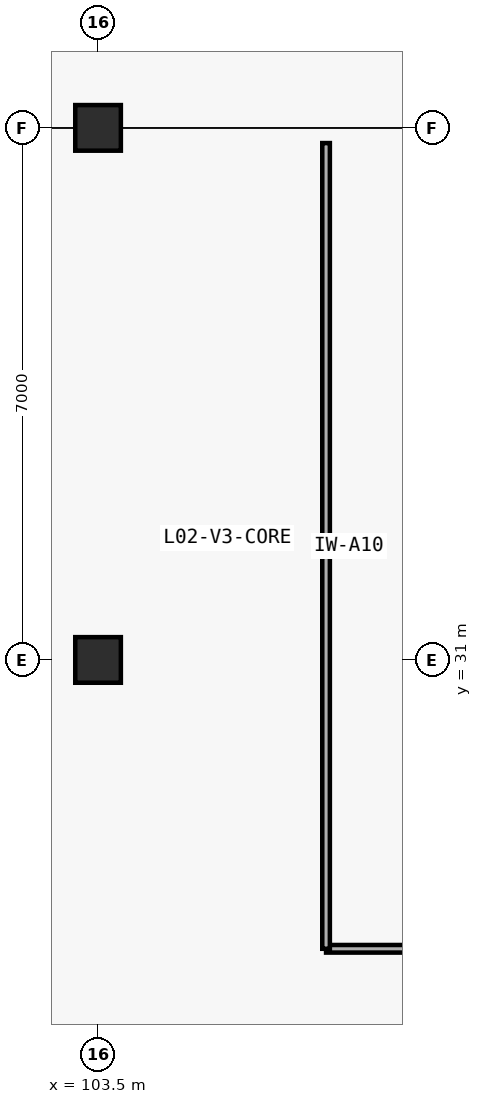
"""IFC4 building model, lengths in metres.
Left out: names, types, materials, properties, quantities, classifications, styles, units other than length and angle.
Written with IfcOpenShell. Run it as: python <this file> out.ifc"""

import sys

from ifc_helpers import new_model, si_unit, direction, frame, frame_2d, origin, origin_2d, place, context, subcontext, project, spatial, rectangle, extrude, element, save


model = new_model("IFC4")
c1 = context("Model", 3, precision=1e-05, world=origin(), true_north=direction((0.0, 1.0)))
c2 = subcontext(c1, "Body", "Model", "MODEL_VIEW")
j1 = project(units=[si_unit("LENGTHUNIT", "METRE"), si_unit("PLANEANGLEUNIT", "RADIAN")], contexts=[c1])
p1 = place(None, origin())
s1 = spatial("IfcSite", under=j1, at=p1, CompositionType="ELEMENT")
p2 = place(p1, origin())
s2 = spatial("IfcBuilding", under=s1, at=p2, CompositionType="ELEMENT")
p3 = place(p2, frame((0.0, 0.0, 8.4)))
s3 = spatial("IfcBuildingStorey", under=s2, at=p3, CompositionType="ELEMENT", Elevation=8.4)
for number, where, z_axis, x_axis in (
    (1, (103.5, 31.0, 0.0), (0.0, 0.0, 1.0), (1.0, 0.0, 0.0)),
    (2, (103.5, 38.0, 0.0), (0.0, 0.0, 1.0), (1.0, 0.0, 0.0)),
):
    element("IfcColumn", number, at=place(p3, frame(where, z_axis=z_axis, x_axis=x_axis)), inside=s3, PredefinedType="COLUMN", context=c2, shape_type="SweptSolid", body=[
        extrude(rectangle(XDim=0.6, YDim=0.6, at=origin_2d()), origin(), (0.0, 0.0, 1.0), 4.2),
    ])
p4 = place(p3, frame((106.5, 27.2, 0.0), z_axis=(0.0, 0.0, 1.0), x_axis=(1.0, 0.0, 0.0)))
e3 = element("IfcWall", 3, at=p4, inside=s3, PredefinedType="PARTITIONING", context=c2, shape_type="SweptSolid", body=[
    extrude(rectangle(XDim=10.0, YDim=0.1, at=frame_2d((5.0, 0.0))), origin(), (0.0, 0.0, 1.0), 3.9),
])
p5 = place(p4, frame((4.425, 0.0, 0.0)))
e4 = element("IfcOpeningElement", 4, at=p5, cuts=e3, PredefinedType="OPENING", context=c2, shape_type="SweptSolid", body=[
    extrude(rectangle(XDim=1.15, YDim=2.15, at=frame_2d((0.575, 1.075))), frame((0.0, 0.06, 0.0), z_axis=(0.0, -1.0, 0.0), x_axis=(1.0, 0.0, 0.0)), (0.0, 0.0, 1.0), 0.12),
])
p6 = place(p3, frame((106.5, 27.2, 0.0), z_axis=(0.0, 0.0, 1.0), x_axis=(0.0, 1.0, 0.0)))
e5 = element("IfcWall", 5, at=p6, inside=s3, PredefinedType="PARTITIONING", context=c2, shape_type="SweptSolid", body=[
    extrude(rectangle(XDim=10.6, YDim=0.1, at=frame_2d((5.3, 0.0))), origin(), (0.0, 0.0, 1.0), 3.9),
])
save(model, sys.argv[1])
